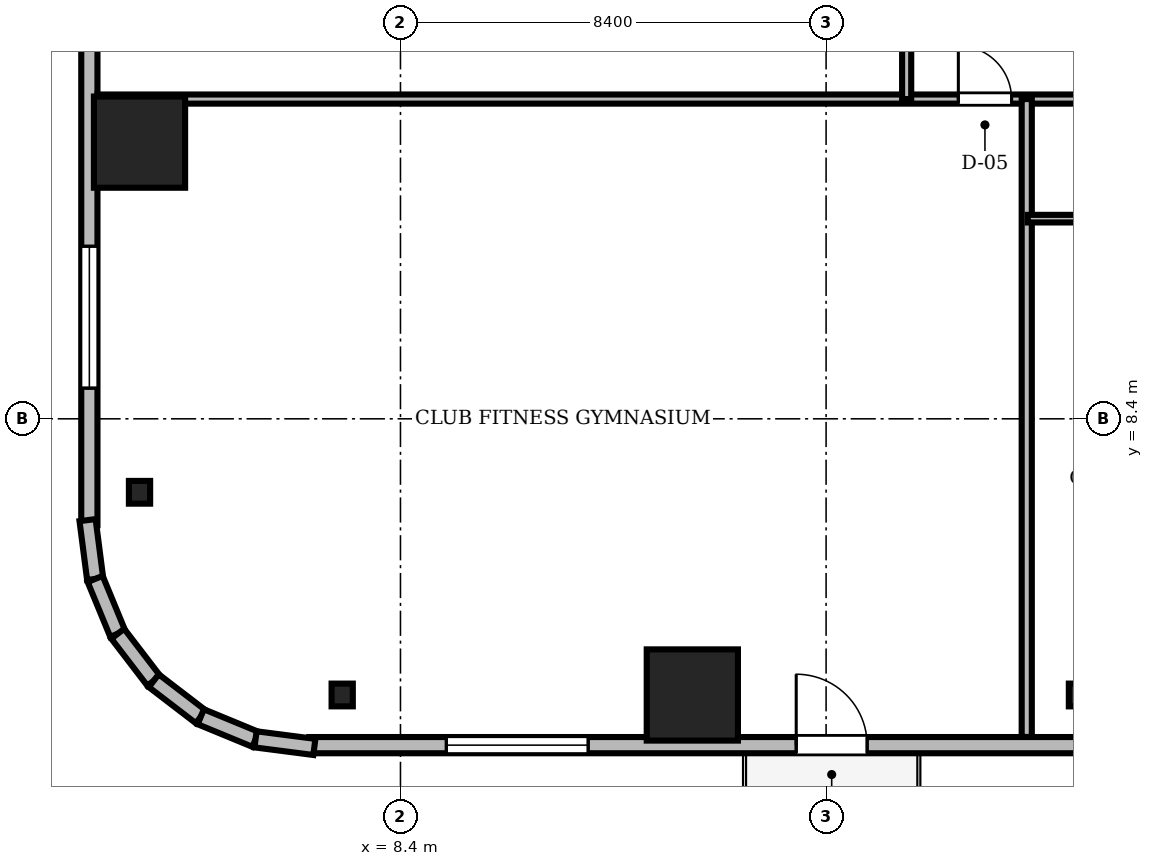
"""IFC4 building model, lengths in metres.
Left out: names, types, materials, properties, quantities, classifications, styles, units other than length and angle.
Written with IfcOpenShell. Run it as: python <this file> out.ifc"""

import sys

from ifc_helpers import new_model, si_unit, direction, frame, frame_2d, origin, origin_2d, place, context, subcontext, project, spatial, rectangle, i_section, extrude, source, transform, mapped, element, fill, save


model = new_model("IFC4")
c1 = context("Model", 3, precision=1e-05, world=origin(), true_north=direction((0.0, 1.0)))
c2 = subcontext(c1, "Body", "Model", "MODEL_VIEW")
j1 = project(units=[si_unit("LENGTHUNIT", "METRE"), si_unit("PLANEANGLEUNIT", "RADIAN")], contexts=[c1])
p1 = place(None, origin())
s1 = spatial("IfcSite", under=j1, at=p1, CompositionType="ELEMENT")
p2 = place(p1, origin())
s2 = spatial("IfcBuilding", under=s1, at=p2, CompositionType="ELEMENT")
p3 = place(p2, frame((0.0, 0.0, 42.2)))
s3 = spatial("IfcBuildingStorey", under=s2, at=p3, CompositionType="ELEMENT", Elevation=42.2)
m1 = source(origin(), c2, "Body", "SweptSolid", [
    extrude(rectangle(XDim=1.8, YDim=1.8, at=origin_2d()), origin(), (0.0, 0.0, 1.0), 3.41),
])
for number, where, z_axis, x_axis in (
    (1, (14.16, 2.95, 0.0), (0.0, 0.0, 1.0), (1.0, 0.0, 0.0)),
    (2, (3.25, 13.86, 0.0), (0.0, 0.0, 1.0), (1.0, 0.0, 0.0)),
):
    element("IfcColumn", number, at=place(p3, frame(where, z_axis=z_axis, x_axis=x_axis)), inside=s3, PredefinedType="COLUMN", context=c2, shape_type="MappedRepresentation", body=[
        mapped(m1, transform((0.0, 0.0, 0.0), scale=1.0)),
    ])
m2 = source(origin(), c2, "Body", "SweptSolid", [
    extrude(i_section(OverallWidth=0.419, OverallDepth=0.449, WebThickness=0.031, FlangeThickness=0.048, FilletRadius=0.015, at=origin_2d()), origin(), (0.0, 0.0, 1.0), 3.41),
])
for number, where, z_axis, x_axis in (
    (3, (7.25, 2.95, 0.0), (0.0, 0.0, 1.0), (1.0, 0.0, 0.0)),
    (4, (21.8, 2.95, 0.0), (0.0, 0.0, 1.0), (1.0, 0.0, 0.0)),
    (5, (3.25, 6.95, 0.0), (0.0, 0.0, 1.0), (1.0, 0.0, 0.0)),
):
    element("IfcColumn", number, at=place(p3, frame(where, z_axis=z_axis, x_axis=x_axis)), inside=s3, PredefinedType="COLUMN", context=c2, shape_type="MappedRepresentation", body=[
        mapped(m2, transform((0.0, 0.0, 0.0), scale=1.0)),
    ])
m3 = source(origin(), c2, "Body", "SweptSolid", [
    extrude(rectangle(XDim=15.6, YDim=0.32, at=frame_2d((7.8, 0.0))), origin(), (0.0, 0.0, 1.0), 3.41),
])
p4 = place(p3, frame((6.6, 1.96, 0.0), z_axis=(0.0, 0.0, 1.0), x_axis=(1.0, 0.0, 0.0)))
e6 = element("IfcWall", 6, at=p4, inside=s3, PredefinedType="SOLIDWALL", context=c2, shape_type="MappedRepresentation", body=[
    mapped(m3, transform((0.0, 0.0, 0.0), scale=1.0)),
])
m4 = source(origin(), c2, "Body", "SweptSolid", [
    extrude(rectangle(XDim=1.4, YDim=2.3, at=frame_2d((0.7, 1.15))), frame((0.0, 0.17, 0.0), z_axis=(0.0, -1.0, 0.0), x_axis=(1.0, 0.0, 0.0)), (0.0, 0.0, 1.0), 0.34),
])
p5 = place(p4, frame((9.61, 0.0, 0.0)))
e7 = element("IfcOpeningElement", 7, at=p5, cuts=e6, PredefinedType="OPENING", context=c2, shape_type="MappedRepresentation", body=[
    mapped(m4, transform((0.0, 0.0, 0.0), scale=1.0)),
])
m5 = source(origin(), c2, "Body", "SweptSolid", [
    extrude(rectangle(XDim=2.8, YDim=2.4, at=frame_2d((1.4, 1.2))), frame((0.0, 0.17, 0.0), z_axis=(0.0, -1.0, 0.0), x_axis=(1.0, 0.0, 0.0)), (0.0, 0.0, 1.0), 0.34),
])
p6 = place(p4, frame((2.705, 0.0, 0.72)))
e8 = element("IfcOpeningElement", 8, at=p6, cuts=e6, PredefinedType="OPENING", context=c2, shape_type="MappedRepresentation", body=[
    mapped(m5, transform((0.0, 0.0, 0.0), scale=1.0)),
])
p7 = place(p3, frame((2.26, 21.9, 0.0), z_axis=(0.0, 0.0, 1.0), x_axis=(0.0, -1.0, 0.0)))
e9 = element("IfcWall", 9, at=p7, inside=s3, PredefinedType="SOLIDWALL", context=c2, shape_type="MappedRepresentation", body=[
    mapped(m3, transform((0.0, 0.0, 0.0), scale=1.0)),
])
p8 = place(p7, frame((10.095, 0.0, 0.72)))
e10 = element("IfcOpeningElement", 10, at=p8, cuts=e9, PredefinedType="OPENING", context=c2, shape_type="MappedRepresentation", body=[
    mapped(m5, transform((0.0, 0.0, 0.0), scale=1.0)),
])
m6 = source(origin(), c2, "Body", "SweptSolid", [
    extrude(rectangle(XDim=1.171, YDim=0.32, at=frame_2d((0.585, 0.0))), origin(), (0.0, 0.0, 1.0), 3.41),
])
p9 = place(p3, frame((2.224, 6.401, 0.0), z_axis=(0.0, 0.0, 1.0), x_axis=(0.128269133229, -0.991739395941, 0.0)))
e11 = element("IfcWall", 11, at=p9, inside=s3, PredefinedType="SOLIDWALL", context=c2, shape_type="MappedRepresentation", body=[
    mapped(m6, transform((0.0, 0.0, 0.0), scale=1.0)),
])
m7 = source(origin(), c2, "Body", "SweptSolid", [
    extrude(rectangle(XDim=1.169, YDim=0.32, at=frame_2d((0.584, 0.0))), origin(), (0.0, 0.0, 1.0), 3.41),
])
for number, where, z_axis, x_axis in (
    (12, (2.375, 5.24, 0.0), (0.0, 0.0, 1.0), (0.381, -0.925, 0.0)),
    (13, (2.82, 4.159, 0.0), (0.0, 0.0, 1.0), (0.608, -0.794, 0.0)),
):
    element("IfcWall", number, at=place(p3, frame(where, z_axis=z_axis, x_axis=x_axis)), inside=s3, PredefinedType="SOLIDWALL", context=c2, shape_type="MappedRepresentation", body=[
        mapped(m7, transform((0.0, 0.0, 0.0), scale=1.0)),
    ])
m8 = source(origin(), c2, "Body", "SweptSolid", [
    extrude(rectangle(XDim=1.169, YDim=0.32, at=frame_2d((0.584, 0.0))), origin(), (0.0, 0.0, 1.0), 3.41),
])
p10 = place(p3, frame((3.531, 3.231, 0.0), z_axis=(0.0, 0.0, 1.0), x_axis=(0.793663520347, -0.608356981114, 0.0)))
e14 = element("IfcWall", 14, at=p10, inside=s3, PredefinedType="SOLIDWALL", context=c2, shape_type="MappedRepresentation", body=[
    mapped(m8, transform((0.0, 0.0, 0.0), scale=1.0)),
])
m9 = source(origin(), c2, "Body", "SweptSolid", [
    extrude(rectangle(XDim=1.169, YDim=0.32, at=frame_2d((0.585, 0.0))), origin(), (0.0, 0.0, 1.0), 3.41),
])
p11 = place(p3, frame((4.459, 2.52, 0.0), z_axis=(0.0, 0.0, 1.0), x_axis=(0.924479075121, -0.381232789334, 0.0)))
e15 = element("IfcWall", 15, at=p11, inside=s3, PredefinedType="SOLIDWALL", context=c2, shape_type="MappedRepresentation", body=[
    mapped(m9, transform((0.0, 0.0, 0.0), scale=1.0)),
])
m10 = source(origin(), c2, "Body", "SweptSolid", [
    extrude(rectangle(XDim=1.17, YDim=0.32, at=frame_2d((0.585, 0.0))), origin(), (0.0, 0.0, 1.0), 3.41),
])
p12 = place(p3, frame((5.54, 2.074, 0.0), z_axis=(0.0, 0.0, 1.0), x_axis=(0.991762485493, -0.128090485085, 0.0)))
e16 = element("IfcWall", 16, at=p12, inside=s3, PredefinedType="SOLIDWALL", context=c2, shape_type="MappedRepresentation", body=[
    mapped(m10, transform((0.0, 0.0, 0.0), scale=1.0)),
])
m11 = source(origin(), c2, "Body", "SweptSolid", [
    extrude(rectangle(XDim=46.156, YDim=0.18, at=frame_2d((23.078, 0.0))), origin(), (0.0, 0.0, 1.0), 2.652),
])
p13 = place(p3, frame((2.422, 14.71, 0.0), z_axis=(0.0, 0.0, 1.0), x_axis=(1.0, 0.0, 0.0)))
e17 = element("IfcWall", 17, at=p13, inside=s3, PredefinedType="PARTITIONING", context=c2, shape_type="MappedRepresentation", body=[
    mapped(m11, transform((0.0, 0.0, 0.0), scale=1.0)),
])
m12 = source(origin(), c2, "Body", "SweptSolid", [
    extrude(rectangle(XDim=1.05, YDim=2.2, at=frame_2d((0.525, 1.1))), frame((0.0, 0.1, 0.0), z_axis=(0.0, -1.0, 0.0), x_axis=(1.0, 0.0, 0.0)), (0.0, 0.0, 1.0), 0.2),
])
p14 = place(p13, frame((16.988, 0.0, 0.0)))
e18 = element("IfcOpeningElement", 18, at=p14, cuts=e17, PredefinedType="OPENING", context=c2, shape_type="MappedRepresentation", body=[
    mapped(m12, transform((0.0, 0.0, 0.0), scale=1.0)),
])
m13 = source(origin(), c2, "Body", "SweptSolid", [
    extrude(rectangle(XDim=0.95, YDim=2.15, at=frame_2d((0.475, 1.075))), frame((0.0, 0.1, 0.0), z_axis=(0.0, -1.0, 0.0), x_axis=(1.0, 0.0, 0.0)), (0.0, 0.0, 1.0), 0.2),
])
p15 = place(p13, frame((21.556, 0.0, 0.0)))
e19 = element("IfcOpeningElement", 19, at=p15, cuts=e17, PredefinedType="OPENING", context=c2, shape_type="MappedRepresentation", body=[
    mapped(m13, transform((0.0, 0.0, 0.0), scale=1.0)),
])
p16 = place(p13, frame((25.358, 0.0, 0.0)))
e20 = element("IfcOpeningElement", 20, at=p16, cuts=e17, PredefinedType="OPENING", context=c2, shape_type="MappedRepresentation", body=[
    mapped(m12, transform((0.0, 0.0, 0.0), scale=1.0)),
])
p17 = place(p13, frame((30.385, 0.0, 0.0)))
e21 = element("IfcOpeningElement", 21, at=p17, cuts=e17, PredefinedType="OPENING", context=c2, shape_type="MappedRepresentation", body=[
    mapped(m12, transform((0.0, 0.0, 0.0), scale=1.0)),
])
p18 = place(p13, frame((35.411, 0.0, 0.0)))
e22 = element("IfcOpeningElement", 22, at=p18, cuts=e17, PredefinedType="OPENING", context=c2, shape_type="MappedRepresentation", body=[
    mapped(m12, transform((0.0, 0.0, 0.0), scale=1.0)),
])
p19 = place(p13, frame((41.766, 0.0, 0.0)))
e23 = element("IfcOpeningElement", 23, at=p19, cuts=e17, PredefinedType="OPENING", context=c2, shape_type="MappedRepresentation", body=[
    mapped(m12, transform((0.0, 0.0, 0.0), scale=1.0)),
])
m14 = source(origin(), c2, "Body", "SweptSolid", [
    extrude(rectangle(XDim=13.84, YDim=0.18, at=frame_2d((6.92, 0.0))), origin(), (0.0, 0.0, 1.0), 2.802),
])
p20 = place(p3, frame((18.39, 14.71, 0.0), z_axis=(0.0, 0.0, 1.0), x_axis=(0.0, 1.0, 0.0)))
e24 = element("IfcWall", 24, at=p20, inside=s3, PredefinedType="PARTITIONING", context=c2, shape_type="MappedRepresentation", body=[
    mapped(m14, transform((0.0, 0.0, 0.0), scale=1.0)),
])
p21 = place(p20, frame((1.762, 0.0, 0.0)))
e25 = element("IfcOpeningElement", 25, at=p21, cuts=e24, PredefinedType="OPENING", context=c2, shape_type="MappedRepresentation", body=[
    mapped(m12, transform((0.0, 0.0, 0.0), scale=1.0)),
])
p22 = place(p20, frame((7.55, 0.0, 0.0)))
e26 = element("IfcOpeningElement", 26, at=p22, cuts=e24, PredefinedType="OPENING", context=c2, shape_type="MappedRepresentation", body=[
    mapped(m13, transform((0.0, 0.0, 0.0), scale=1.0)),
])
p23 = place(p20, frame((12.113, 0.0, 0.0)))
e27 = element("IfcOpeningElement", 27, at=p23, cuts=e24, PredefinedType="OPENING", context=c2, shape_type="MappedRepresentation", body=[
    mapped(m13, transform((0.0, 0.0, 0.0), scale=1.0)),
])
m15 = source(origin(), c2, "Body", "SweptSolid", [
    extrude(rectangle(XDim=12.588, YDim=0.2, at=frame_2d((6.294, 0.0))), origin(), (0.0, 0.0, 1.0), 2.652),
])
p24 = place(p3, frame((20.76, 2.122, 0.0), z_axis=(0.0, 0.0, 1.0), x_axis=(0.0, 1.0, 0.0)))
e28 = element("IfcWall", 28, at=p24, inside=s3, PredefinedType="PARTITIONING", context=c2, shape_type="MappedRepresentation", body=[
    mapped(m15, transform((0.0, 0.0, 0.0), scale=1.0)),
])
m16 = source(origin(), c2, "Body", "SweptSolid", [
    extrude(rectangle(XDim=2.29, YDim=0.15, at=frame_2d((1.145, 0.0))), origin(), (0.0, 0.0, 1.0), 3.41),
])
p25 = place(p3, frame((20.78, 12.35, 0.0), z_axis=(0.0, 0.0, 1.0), x_axis=(1.0, 0.0, 0.0)))
e29 = element("IfcWall", 29, at=p25, inside=s3, PredefinedType="PARTITIONING", context=c2, shape_type="MappedRepresentation", body=[
    mapped(m16, transform((0.0, 0.0, 0.0), scale=1.0)),
])
m17 = source(origin(), c2, "Body", "SweptSolid", [
    extrude(rectangle(XDim=1.4, YDim=2.3, at=frame_2d((0.7, 1.15))), frame((0.0, 0.025, 0.0), z_axis=(0.0, -1.0, 0.0), x_axis=(1.0, 0.0, 0.0)), (0.0, 0.0, 1.0), 0.05),
])
p26 = place(p5, frame((1.4, 0.0, 0.0), z_axis=(0.0, 0.0, 1.0), x_axis=(-1.0, 0.0, 0.0)))
e30 = element("IfcDoor", 30, at=p26, inside=s3, OperationType="DOUBLE_DOOR_SLIDING", PredefinedType="DOOR", context=c2, shape_type="MappedRepresentation", body=[
    mapped(m17, transform((0.0, 0.0, 0.0), scale=1.0)),
])
fill(e7, e30)
m18 = source(origin(), c2, "Body", "SweptSolid", [
    extrude(rectangle(XDim=2.8, YDim=2.4, at=frame_2d((1.4, 1.2))), frame((0.0, 0.03, 0.0), z_axis=(0.0, -1.0, 0.0), x_axis=(1.0, 0.0, 0.0)), (0.0, 0.0, 1.0), 0.06),
])
p27 = place(p6, origin())
e31 = element("IfcWindow", 31, at=p27, inside=s3, PartitioningType="SINGLE_PANEL", PredefinedType="WINDOW", context=c2, shape_type="MappedRepresentation", body=[
    mapped(m18, transform((0.0, 0.0, 0.0), scale=1.0)),
])
fill(e8, e31)
p28 = place(p8, origin())
e32 = element("IfcWindow", 32, at=p28, inside=s3, PartitioningType="SINGLE_PANEL", PredefinedType="WINDOW", context=c2, shape_type="MappedRepresentation", body=[
    mapped(m18, transform((0.0, 0.0, 0.0), scale=1.0)),
])
fill(e10, e32)
m19 = source(origin(), c2, "Body", "SweptSolid", [
    extrude(rectangle(XDim=1.05, YDim=2.2, at=frame_2d((0.525, 1.1))), frame((0.0, 0.025, 0.0), z_axis=(0.0, -1.0, 0.0), x_axis=(1.0, 0.0, 0.0)), (0.0, 0.0, 1.0), 0.05),
])
p29 = place(p14, origin())
e33 = element("IfcDoor", 33, at=p29, inside=s3, OperationType="SINGLE_SWING_LEFT", PredefinedType="DOOR", context=c2, shape_type="MappedRepresentation", body=[
    mapped(m19, transform((0.0, 0.0, 0.0), scale=1.0)),
])
fill(e18, e33)
save(model, sys.argv[1])
